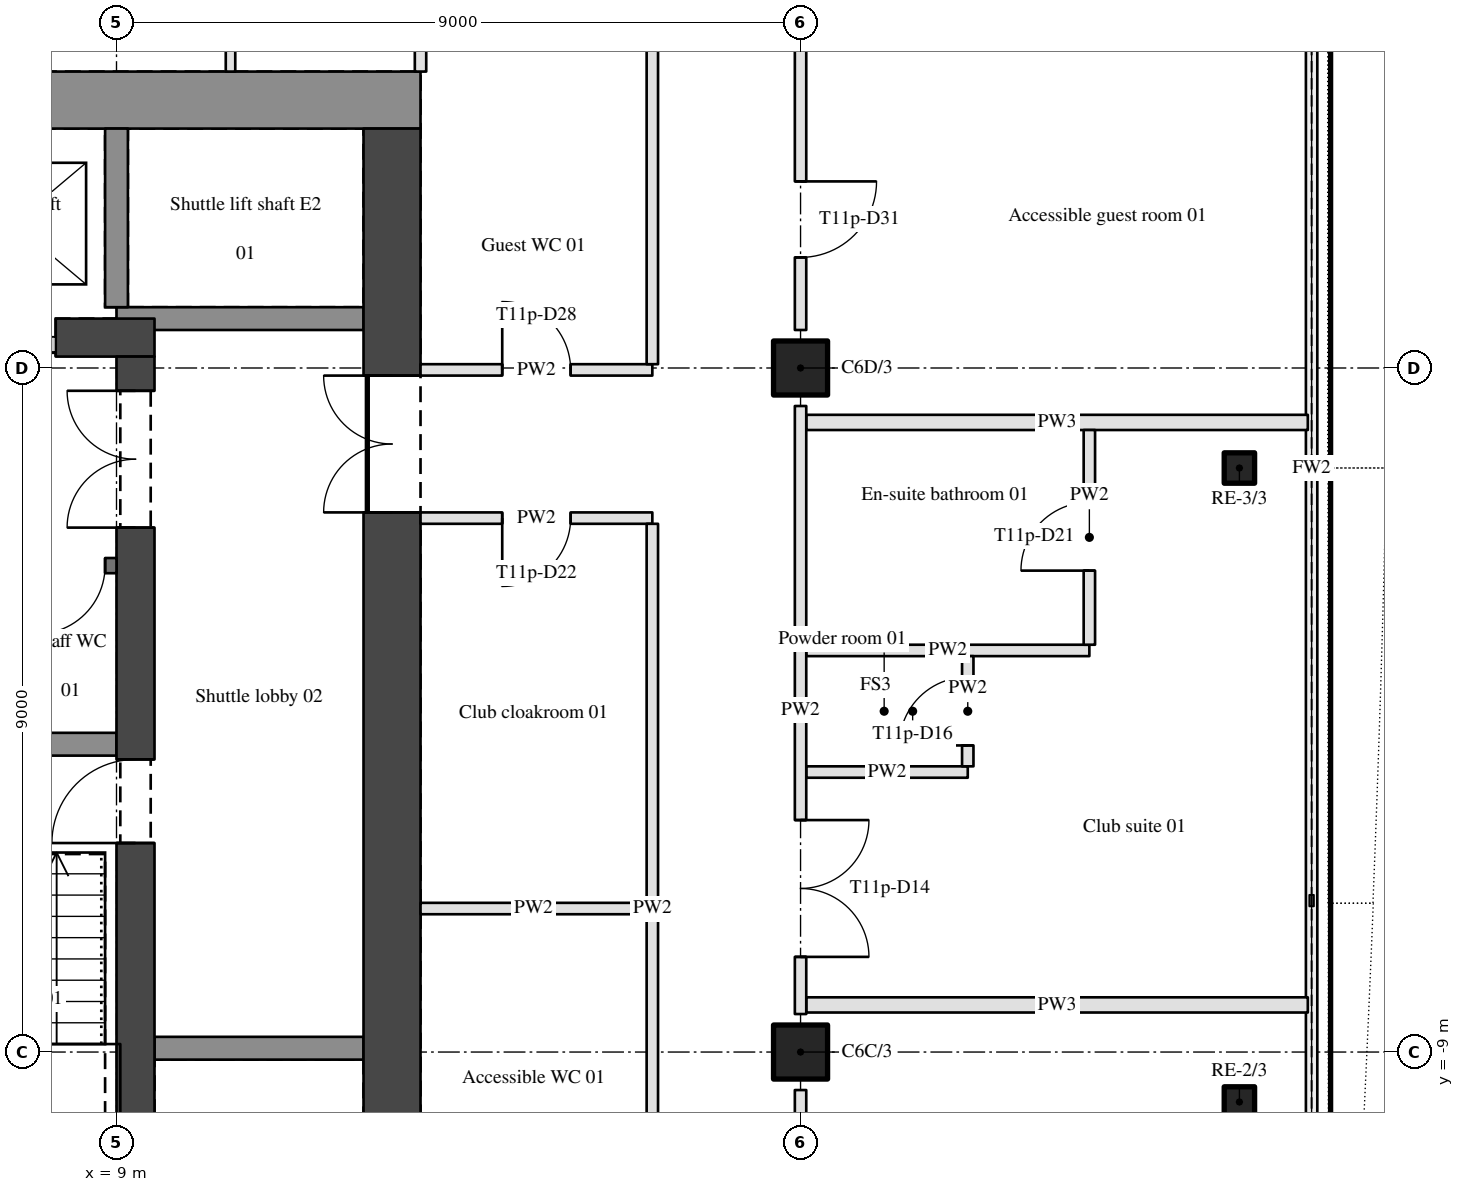
"""IFC4 building model, lengths in metres.
Left out: names, types, materials, properties, quantities, classifications, styles, units other than length and angle.
Written with IfcOpenShell. Run it as: python <this file> out.ifc"""

import sys

from ifc_helpers import new_model, si_unit, direction, frame, frame_2d, origin, origin_2d, place, context, subcontext, project, spatial, rectangle, hollow_rectangle, hollow_circle, extrude, element, fill, save


model = new_model("IFC4")
c1 = context("Model", 3, precision=1e-05, world=origin(), true_north=direction((0.0, 1.0)))
c2 = subcontext(c1, "Body", "Model", "MODEL_VIEW")
j1 = project(units=[si_unit("LENGTHUNIT", "METRE"), si_unit("PLANEANGLEUNIT", "RADIAN")], contexts=[c1])
p1 = place(None, origin())
s1 = spatial("IfcSite", under=j1, at=p1, CompositionType="ELEMENT")
p2 = place(p1, origin())
s2 = spatial("IfcBuilding", under=s1, at=p2, CompositionType="ELEMENT")
p3 = place(p2, frame((0.0, 0.0, 158.9)))
s3 = spatial("IfcBuildingStorey", under=s2, at=p3, CompositionType="ELEMENT", Elevation=158.9)
for number, where, z_axis, x_axis in (
    (1, (18.0, -9.0, 0.0), (0.0, 0.0, 1.0), (1.0, 0.0, 0.0)),
    (2, (18.0, 0.0, 0.0), (0.0, 0.0, 1.0), (1.0, 0.0, 0.0)),
):
    element("IfcColumn", number, at=place(p3, frame(where, z_axis=z_axis, x_axis=x_axis)), inside=s3, PredefinedType="COLUMN", context=c2, shape_type="SweptSolid", body=[
        extrude(hollow_circle(Radius=0.355, WallThickness=0.032, at=origin_2d()), origin(), (0.0, 0.0, 1.0), 3.4),
    ])
for number, where, z_axis, x_axis in (
    (3, (23.774, -9.657, 0.0), (0.0, 0.0, 1.0), (1.0, 0.0, 0.0)),
    (4, (23.774, -1.316, 0.0), (0.0, 0.0, 1.0), (1.0, 0.0, 0.0)),
):
    element("IfcColumn", number, at=place(p3, frame(where, z_axis=z_axis, x_axis=x_axis)), inside=s3, PredefinedType="COLUMN", context=c2, shape_type="SweptSolid", body=[
        extrude(hollow_rectangle(XDim=0.4, YDim=0.4, WallThickness=0.02, InnerFilletRadius=0.03, OuterFilletRadius=0.05, at=origin_2d()), origin(), (0.0, 0.0, 1.0), 3.4),
    ])
p4 = place(p3, frame((-13.0, 3.525, 0.0), z_axis=(0.0, 0.0, 1.0), x_axis=(1.0, 0.0, 0.0)))
e5 = element("IfcWall", 5, at=p4, inside=s3, PredefinedType="SHEAR", context=c2, shape_type="SweptSolid", body=[
    extrude(rectangle(XDim=26.0, YDim=0.75, at=frame_2d((13.0, 0.0))), origin(), (0.0, 0.0, 1.0), 3.4),
])
p5 = place(p3, frame((12.625, -11.5, 0.0), z_axis=(0.0, 0.0, 1.0), x_axis=(0.0, 1.0, 0.0)))
e6 = element("IfcWall", 6, at=p5, inside=s3, PredefinedType="SHEAR", context=c2, shape_type="SweptSolid", body=[
    extrude(rectangle(XDim=14.65, YDim=0.75, at=frame_2d((7.325, 0.0))), origin(), (0.0, 0.0, 1.0), 3.4),
])
p6 = place(p5, frame((9.6, 0.0, 0.0)))
e7 = element("IfcOpeningElement", 7, at=p6, cuts=e6, PredefinedType="OPENING", context=c2, shape_type="SweptSolid", body=[
    extrude(rectangle(XDim=1.8, YDim=2.1, at=frame_2d((0.9, 1.05))), frame((0.0, 0.385, 0.0), z_axis=(0.0, -1.0, 0.0), x_axis=(1.0, 0.0, 0.0)), (0.0, 0.0, 1.0), 0.77),
])
p7 = place(p3, frame((-9.5, 0.4, 0.0), z_axis=(0.0, 0.0, 1.0), x_axis=(1.0, 0.0, 0.0)))
e8 = element("IfcWall", 8, at=p7, inside=s3, PredefinedType="SHEAR", context=c2, shape_type="SweptSolid", body=[
    extrude(rectangle(XDim=19.0, YDim=0.5, at=frame_2d((9.5, 0.0))), origin(), (0.0, 0.0, 1.0), 3.4),
])
p8 = place(p7, frame((1.3, 0.0, 0.0)))
e9 = element("IfcOpeningElement", 9, at=p8, cuts=e8, PredefinedType="OPENING", context=c2, shape_type="SweptSolid", body=[
    extrude(rectangle(XDim=1.1, YDim=2.1, at=frame_2d((0.55, 1.05))), frame((0.0, 0.26, 0.0), z_axis=(0.0, -1.0, 0.0), x_axis=(1.0, 0.0, 0.0)), (0.0, 0.0, 1.0), 0.52),
])
p9 = place(p7, frame((4.0, 0.0, 0.0)))
e10 = element("IfcOpeningElement", 10, at=p9, cuts=e8, PredefinedType="OPENING", context=c2, shape_type="SweptSolid", body=[
    extrude(rectangle(XDim=1.1, YDim=2.1, at=frame_2d((0.55, 1.05))), frame((0.0, 0.26, 0.0), z_axis=(0.0, -1.0, 0.0), x_axis=(1.0, 0.0, 0.0)), (0.0, 0.0, 1.0), 0.52),
])
p10 = place(p7, frame((6.7, 0.0, 0.0)))
e11 = element("IfcOpeningElement", 11, at=p10, cuts=e8, PredefinedType="OPENING", context=c2, shape_type="SweptSolid", body=[
    extrude(rectangle(XDim=1.1, YDim=2.1, at=frame_2d((0.55, 1.05))), frame((0.0, 0.26, 0.0), z_axis=(0.0, -1.0, 0.0), x_axis=(1.0, 0.0, 0.0)), (0.0, 0.0, 1.0), 0.52),
])
p11 = place(p7, frame((11.2, 0.0, 0.0)))
e12 = element("IfcOpeningElement", 12, at=p11, cuts=e8, PredefinedType="OPENING", context=c2, shape_type="SweptSolid", body=[
    extrude(rectangle(XDim=1.1, YDim=2.1, at=frame_2d((0.55, 1.05))), frame((0.0, 0.26, 0.0), z_axis=(0.0, -1.0, 0.0), x_axis=(1.0, 0.0, 0.0)), (0.0, 0.0, 1.0), 0.52),
])
p12 = place(p7, frame((13.9, 0.0, 0.0)))
e13 = element("IfcOpeningElement", 13, at=p12, cuts=e8, PredefinedType="OPENING", context=c2, shape_type="SweptSolid", body=[
    extrude(rectangle(XDim=1.1, YDim=2.1, at=frame_2d((0.55, 1.05))), frame((0.0, 0.26, 0.0), z_axis=(0.0, -1.0, 0.0), x_axis=(1.0, 0.0, 0.0)), (0.0, 0.0, 1.0), 0.52),
])
p13 = place(p7, frame((16.6, 0.0, 0.0)))
e14 = element("IfcOpeningElement", 14, at=p13, cuts=e8, PredefinedType="OPENING", context=c2, shape_type="SweptSolid", body=[
    extrude(rectangle(XDim=1.1, YDim=2.1, at=frame_2d((0.55, 1.05))), frame((0.0, 0.26, 0.0), z_axis=(0.0, -1.0, 0.0), x_axis=(1.0, 0.0, 0.0)), (0.0, 0.0, 1.0), 0.52),
])
p14 = place(p3, frame((9.25, -11.5, 0.0), z_axis=(0.0, 0.0, 1.0), x_axis=(0.0, 1.0, 0.0)))
e15 = element("IfcWall", 15, at=p14, inside=s3, PredefinedType="SHEAR", context=c2, shape_type="SweptSolid", body=[
    extrude(rectangle(XDim=11.65, YDim=0.5, at=frame_2d((5.825, 0.0))), origin(), (0.0, 0.0, 1.0), 3.4),
])
p15 = place(p14, frame((9.4, 0.0, 0.0)))
e16 = element("IfcOpeningElement", 16, at=p15, cuts=e15, PredefinedType="OPENING", context=c2, shape_type="SweptSolid", body=[
    extrude(rectangle(XDim=1.8, YDim=2.1, at=frame_2d((0.9, 1.05))), frame((0.0, 0.26, 0.0), z_axis=(0.0, -1.0, 0.0), x_axis=(1.0, 0.0, 0.0)), (0.0, 0.0, 1.0), 0.52),
])
p16 = place(p14, frame((5.25, 0.0, 0.0)))
e17 = element("IfcOpeningElement", 17, at=p16, cuts=e15, PredefinedType="OPENING", context=c2, shape_type="SweptSolid", body=[
    extrude(rectangle(XDim=1.1, YDim=2.1, at=frame_2d((0.55, 1.05))), frame((0.0, 0.26, 0.0), z_axis=(0.0, -1.0, 0.0), x_axis=(1.0, 0.0, 0.0)), (0.0, 0.0, 1.0), 0.52),
])
p17 = place(p3, frame((9.5, -8.95, 0.0), z_axis=(0.0, 0.0, 1.0), x_axis=(1.0, 0.0, 0.0)))
e18 = element("IfcWall", 18, at=p17, inside=s3, PredefinedType="SHEAR", context=c2, shape_type="SweptSolid", body=[
    extrude(rectangle(XDim=2.75, YDim=0.3, at=frame_2d((1.375, 0.0))), origin(), (0.0, 0.0, 1.0), 3.4),
])
p18 = place(p3, frame((18.075, -8.38, 0.0), z_axis=(0.0, 0.0, 1.0), x_axis=(1.0, 0.0, 0.0)))
e19 = element("IfcWall", 19, at=p18, inside=s3, PredefinedType="PARTITIONING", context=c2, shape_type="SweptSolid", body=[
    extrude(rectangle(XDim=6.599, YDim=0.2, at=frame_2d((3.3, 0.0))), origin(), (0.0, 0.0, 1.0), 2.46),
])
p19 = place(p3, frame((13.0, -7.112, 0.0), z_axis=(0.0, 0.0, 1.0), x_axis=(1.0, 0.0, 0.0)))
e20 = element("IfcWall", 20, at=p19, inside=s3, PredefinedType="PARTITIONING", context=c2, shape_type="SweptSolid", body=[
    extrude(rectangle(XDim=2.975, YDim=0.15, at=frame_2d((1.488, 0.0))), origin(), (0.0, 0.0, 1.0), 2.46),
])
p20 = place(p3, frame((18.075, -5.316, 0.0), z_axis=(0.0, 0.0, 1.0), x_axis=(1.0, 0.0, 0.0)))
e21 = element("IfcWall", 21, at=p20, inside=s3, PredefinedType="PARTITIONING", context=c2, shape_type="SweptSolid", body=[
    extrude(rectangle(XDim=2.125, YDim=0.15, at=frame_2d((1.062, 0.0))), origin(), (0.0, 0.0, 1.0), 2.46),
])
p21 = place(p3, frame((2.25, -4.95, 0.0), z_axis=(0.0, 0.0, 1.0), x_axis=(1.0, 0.0, 0.0)))
e22 = element("IfcWall", 22, at=p21, inside=s3, PredefinedType="SHEAR", context=c2, shape_type="SweptSolid", body=[
    extrude(rectangle(XDim=6.75, YDim=0.3, at=frame_2d((3.375, 0.0))), origin(), (0.0, 0.0, 1.0), 3.4),
])
p22 = place(p3, frame((18.075, -3.716, 0.0), z_axis=(0.0, 0.0, 1.0), x_axis=(1.0, 0.0, 0.0)))
e23 = element("IfcWall", 23, at=p22, inside=s3, PredefinedType="PARTITIONING", context=c2, shape_type="SweptSolid", body=[
    extrude(rectangle(XDim=3.725, YDim=0.15, at=frame_2d((1.863, 0.0))), origin(), (0.0, 0.0, 1.0), 2.46),
])
p23 = place(p3, frame((9.0, -2.6, 0.0), z_axis=(0.0, 0.0, 1.0), x_axis=(-1.0, 0.0, 0.0)))
e24 = element("IfcWall", 24, at=p23, inside=s3, PredefinedType="SOLIDWALL", context=c2, shape_type="SweptSolid", body=[
    extrude(rectangle(XDim=1.2, YDim=0.2, at=frame_2d((0.6, 0.0))), origin(), (0.0, 0.0, 1.0), 3.1),
])
p24 = place(p23, frame((0.15, 0.0, 0.0)))
e25 = element("IfcOpeningElement", 25, at=p24, cuts=e24, PredefinedType="OPENING", context=c2, shape_type="SweptSolid", body=[
    extrude(rectangle(XDim=0.9, YDim=2.1, at=frame_2d((0.45, 1.05))), frame((0.0, 0.11, 0.0), z_axis=(0.0, -1.0, 0.0), x_axis=(1.0, 0.0, 0.0)), (0.0, 0.0, 1.0), 0.22),
])
p25 = place(p3, frame((16.05, -1.975, 0.0), z_axis=(0.0, 0.0, 1.0), x_axis=(-1.0, 0.0, 0.0)))
e26 = element("IfcWall", 26, at=p25, inside=s3, PredefinedType="PARTITIONING", context=c2, shape_type="SweptSolid", body=[
    extrude(rectangle(XDim=3.05, YDim=0.15, at=frame_2d((1.525, 0.0))), origin(), (0.0, 0.0, 1.0), 2.46),
])
p26 = place(p25, frame((1.075, 0.0, 0.0)))
e27 = element("IfcOpeningElement", 27, at=p26, cuts=e26, PredefinedType="OPENING", context=c2, shape_type="SweptSolid", body=[
    extrude(rectangle(XDim=0.9, YDim=2.1, at=frame_2d((0.45, 1.05))), frame((0.0, 0.085, 0.0), z_axis=(0.0, -1.0, 0.0), x_axis=(1.0, 0.0, 0.0)), (0.0, 0.0, 1.0), 0.17),
])
p27 = place(p3, frame((18.075, -0.716, 0.0), z_axis=(0.0, 0.0, 1.0), x_axis=(1.0, 0.0, 0.0)))
e28 = element("IfcWall", 28, at=p27, inside=s3, PredefinedType="PARTITIONING", context=c2, shape_type="SweptSolid", body=[
    extrude(rectangle(XDim=6.599, YDim=0.2, at=frame_2d((3.3, 0.0))), origin(), (0.0, 0.0, 1.0), 2.46),
])
p28 = place(p3, frame((13.0, -0.025, 0.0), z_axis=(0.0, 0.0, 1.0), x_axis=(1.0, 0.0, 0.0)))
e29 = element("IfcWall", 29, at=p28, inside=s3, PredefinedType="PARTITIONING", context=c2, shape_type="SweptSolid", body=[
    extrude(rectangle(XDim=3.05, YDim=0.15, at=frame_2d((1.525, 0.0))), origin(), (0.0, 0.0, 1.0), 2.46),
])
p29 = place(p28, frame((1.075, 0.0, 0.0)))
e30 = element("IfcOpeningElement", 30, at=p29, cuts=e29, PredefinedType="OPENING", context=c2, shape_type="SweptSolid", body=[
    extrude(rectangle(XDim=0.9, YDim=2.1, at=frame_2d((0.45, 1.05))), frame((0.0, 0.085, 0.0), z_axis=(0.0, -1.0, 0.0), x_axis=(1.0, 0.0, 0.0)), (0.0, 0.0, 1.0), 0.17),
])
p30 = place(p3, frame((12.25, 0.65, 0.0), z_axis=(0.0, 0.0, 1.0), x_axis=(-1.0, 0.0, 0.0)))
e31 = element("IfcWall", 31, at=p30, inside=s3, PredefinedType="SHEAR", context=c2, shape_type="SweptSolid", body=[
    extrude(rectangle(XDim=3.25, YDim=0.3, at=frame_2d((1.625, 0.0))), origin(), (0.0, 0.0, 1.0), 3.4),
])
p31 = place(p3, frame((9.0, 0.8, 0.0), z_axis=(0.0, 0.0, 1.0), x_axis=(0.0, 1.0, 0.0)))
e32 = element("IfcWall", 32, at=p31, inside=s3, PredefinedType="SHEAR", context=c2, shape_type="SweptSolid", body=[
    extrude(rectangle(XDim=2.35, YDim=0.3, at=frame_2d((1.175, 0.0))), origin(), (0.0, 0.0, 1.0), 3.4),
])
p32 = place(p3, frame((10.5, 3.9, 0.0), z_axis=(0.0, 0.0, 1.0), x_axis=(0.0, 1.0, 0.0)))
e33 = element("IfcWall", 33, at=p32, inside=s3, PredefinedType="PARTITIONING", context=c2, shape_type="SweptSolid", body=[
    extrude(rectangle(XDim=6.725, YDim=0.125, at=frame_2d((3.363, 0.0))), origin(), (0.0, 0.0, 1.0), 2.46),
])
p33 = place(p3, frame((13.0, 3.9, 0.0), z_axis=(0.0, 0.0, 1.0), x_axis=(0.0, 1.0, 0.0)))
e34 = element("IfcWall", 34, at=p33, inside=s3, PredefinedType="PARTITIONING", context=c2, shape_type="SweptSolid", body=[
    extrude(rectangle(XDim=1.362, YDim=0.15, at=frame_2d((0.681, 0.0))), origin(), (0.0, 0.0, 1.0), 2.46),
])
p34 = place(p3, frame((16.05, -12.175, 0.0), z_axis=(0.0, 0.0, 1.0), x_axis=(0.0, 1.0, 0.0)))
e35 = element("IfcWall", 35, at=p34, inside=s3, PredefinedType="PARTITIONING", context=c2, shape_type="SweptSolid", body=[
    extrude(rectangle(XDim=10.125, YDim=0.15, at=frame_2d((5.062, 0.0))), origin(), (0.0, 0.0, 1.0), 2.46),
])
p35 = place(p3, frame((16.05, 0.05, 0.0), z_axis=(0.0, 0.0, 1.0), x_axis=(0.0, 1.0, 0.0)))
e36 = element("IfcWall", 36, at=p35, inside=s3, PredefinedType="PARTITIONING", context=c2, shape_type="SweptSolid", body=[
    extrude(rectangle(XDim=10.575, YDim=0.15, at=frame_2d((5.288, 0.0))), origin(), (0.0, 0.0, 1.0), 2.46),
])
p36 = place(p3, frame((18.0, -12.175, 0.0), z_axis=(0.0, 0.0, 1.0), x_axis=(0.0, 1.0, 0.0)))
e37 = element("IfcWall", 37, at=p36, inside=s3, PredefinedType="PARTITIONING", context=c2, shape_type="SweptSolid", body=[
    extrude(rectangle(XDim=2.675, YDim=0.15, at=frame_2d((1.337, 0.0))), origin(), (0.0, 0.0, 1.0), 2.46),
])
p37 = place(p3, frame((18.0, -0.5, 0.0), z_axis=(0.0, 0.0, 1.0), x_axis=(0.0, -1.0, 0.0)))
e38 = element("IfcWall", 38, at=p37, inside=s3, PredefinedType="PARTITIONING", context=c2, shape_type="SweptSolid", body=[
    extrude(rectangle(XDim=8.0, YDim=0.15, at=frame_2d((4.0, 0.0))), origin(), (0.0, 0.0, 1.0), 2.46),
])
p38 = place(p37, frame((5.448, 0.0, 0.0)))
e39 = element("IfcOpeningElement", 39, at=p38, cuts=e38, PredefinedType="OPENING", context=c2, shape_type="SweptSolid", body=[
    extrude(rectangle(XDim=1.8, YDim=2.1, at=frame_2d((0.9, 1.05))), frame((0.0, 0.085, 0.0), z_axis=(0.0, -1.0, 0.0), x_axis=(1.0, 0.0, 0.0)), (0.0, 0.0, 1.0), 0.17),
])
p39 = place(p3, frame((18.0, 8.5, 0.0), z_axis=(0.0, 0.0, 1.0), x_axis=(0.0, -1.0, 0.0)))
e40 = element("IfcWall", 40, at=p39, inside=s3, PredefinedType="PARTITIONING", context=c2, shape_type="SweptSolid", body=[
    extrude(rectangle(XDim=8.0, YDim=0.15, at=frame_2d((4.0, 0.0))), origin(), (0.0, 0.0, 1.0), 2.46),
])
p40 = place(p39, frame((6.045, 0.0, 0.0)))
e41 = element("IfcOpeningElement", 41, at=p40, cuts=e40, PredefinedType="OPENING", context=c2, shape_type="SweptSolid", body=[
    extrude(rectangle(XDim=1.0, YDim=2.1, at=frame_2d((0.5, 1.05))), frame((0.0, 0.085, 0.0), z_axis=(0.0, -1.0, 0.0), x_axis=(1.0, 0.0, 0.0)), (0.0, 0.0, 1.0), 0.17),
])
p41 = place(p3, frame((20.2, -5.241, 0.0), z_axis=(0.0, 0.0, 1.0), x_axis=(0.0, 1.0, 0.0)))
e42 = element("IfcWall", 42, at=p41, inside=s3, PredefinedType="PARTITIONING", context=c2, shape_type="SweptSolid", body=[
    extrude(rectangle(XDim=1.45, YDim=0.15, at=frame_2d((0.725, 0.0))), origin(), (0.0, 0.0, 1.0), 2.46),
])
p42 = place(p41, frame((0.275, 0.0, 0.0)))
e43 = element("IfcOpeningElement", 43, at=p42, cuts=e42, PredefinedType="OPENING", context=c2, shape_type="SweptSolid", body=[
    extrude(rectangle(XDim=0.9, YDim=2.1, at=frame_2d((0.45, 1.05))), frame((0.0, 0.085, 0.0), z_axis=(0.0, -1.0, 0.0), x_axis=(1.0, 0.0, 0.0)), (0.0, 0.0, 1.0), 0.17),
])
p43 = place(p3, frame((21.8, -3.641, 0.0), z_axis=(0.0, 0.0, 1.0), x_axis=(0.0, 1.0, 0.0)))
e44 = element("IfcWall", 44, at=p43, inside=s3, PredefinedType="PARTITIONING", context=c2, shape_type="SweptSolid", body=[
    extrude(rectangle(XDim=2.825, YDim=0.15, at=frame_2d((1.413, 0.0))), origin(), (0.0, 0.0, 1.0), 2.46),
])
p44 = place(p43, frame((0.975, 0.0, 0.0)))
e45 = element("IfcOpeningElement", 45, at=p44, cuts=e44, PredefinedType="OPENING", context=c2, shape_type="SweptSolid", body=[
    extrude(rectangle(XDim=0.9, YDim=2.1, at=frame_2d((0.45, 1.05))), frame((0.0, 0.085, 0.0), z_axis=(0.0, -1.0, 0.0), x_axis=(1.0, 0.0, 0.0)), (0.0, 0.0, 1.0), 0.17),
])
p45 = place(p6, origin())
e46 = element("IfcDoor", 46, at=p45, inside=s3, OperationType="DOUBLE_DOOR_SINGLE_SWING", PredefinedType="DOOR", context=c2, shape_type="SweptSolid", body=[
    extrude(rectangle(XDim=1.8, YDim=2.1, at=frame_2d((0.9, 1.05))), frame((0.0, 0.025, 0.0), z_axis=(0.0, -1.0, 0.0), x_axis=(1.0, 0.0, 0.0)), (0.0, 0.0, 1.0), 0.05),
])
fill(e7, e46)
p46 = place(p15, origin())
e47 = element("IfcDoor", 47, at=p46, inside=s3, OperationType="DOUBLE_DOOR_SINGLE_SWING", PredefinedType="DOOR", context=c2, shape_type="SweptSolid", body=[
    extrude(rectangle(XDim=1.8, YDim=2.1, at=frame_2d((0.9, 1.05))), frame((0.0, 0.025, 0.0), z_axis=(0.0, -1.0, 0.0), x_axis=(1.0, 0.0, 0.0)), (0.0, 0.0, 1.0), 0.05),
])
fill(e16, e47)
p47 = place(p16, origin())
e48 = element("IfcDoor", 48, at=p47, inside=s3, OperationType="SINGLE_SWING_LEFT", PredefinedType="DOOR", context=c2, shape_type="SweptSolid", body=[
    extrude(rectangle(XDim=1.1, YDim=2.1, at=frame_2d((0.55, 1.05))), frame((0.0, 0.025, 0.0), z_axis=(0.0, -1.0, 0.0), x_axis=(1.0, 0.0, 0.0)), (0.0, 0.0, 1.0), 0.05),
])
fill(e17, e48)
p48 = place(p24, origin())
e49 = element("IfcDoor", 49, at=p48, inside=s3, OperationType="SINGLE_SWING_RIGHT", PredefinedType="DOOR", context=c2, shape_type="SweptSolid", body=[
    extrude(rectangle(XDim=0.9, YDim=2.1, at=frame_2d((0.45, 1.05))), frame((0.0, 0.025, 0.0), z_axis=(0.0, -1.0, 0.0), x_axis=(1.0, 0.0, 0.0)), (0.0, 0.0, 1.0), 0.05),
])
fill(e25, e49)
p49 = place(p38, origin())
e50 = element("IfcDoor", 50, at=p49, inside=s3, OperationType="DOUBLE_DOOR_SINGLE_SWING", PredefinedType="DOOR", context=c2, shape_type="SweptSolid", body=[
    extrude(rectangle(XDim=1.8, YDim=2.1, at=frame_2d((0.9, 1.05))), frame((0.0, 0.025, 0.0), z_axis=(0.0, -1.0, 0.0), x_axis=(1.0, 0.0, 0.0)), (0.0, 0.0, 1.0), 0.05),
])
fill(e39, e50)
p50 = place(p40, origin())
e51 = element("IfcDoor", 51, at=p50, inside=s3, OperationType="SINGLE_SWING_LEFT", PredefinedType="DOOR", context=c2, shape_type="SweptSolid", body=[
    extrude(rectangle(XDim=1.0, YDim=2.1, at=frame_2d((0.5, 1.05))), frame((0.0, 0.025, 0.0), z_axis=(0.0, -1.0, 0.0), x_axis=(1.0, 0.0, 0.0)), (0.0, 0.0, 1.0), 0.05),
])
fill(e41, e51)
p51 = place(p29, origin())
e52 = element("IfcDoor", 52, at=p51, inside=s3, OperationType="SINGLE_SWING_LEFT", PredefinedType="DOOR", context=c2, shape_type="SweptSolid", body=[
    extrude(rectangle(XDim=0.9, YDim=2.1, at=frame_2d((0.45, 1.05))), frame((0.0, 0.025, 0.0), z_axis=(0.0, -1.0, 0.0), x_axis=(1.0, 0.0, 0.0)), (0.0, 0.0, 1.0), 0.05),
])
fill(e30, e52)
p52 = place(p26, origin())
e53 = element("IfcDoor", 53, at=p52, inside=s3, OperationType="SINGLE_SWING_RIGHT", PredefinedType="DOOR", context=c2, shape_type="SweptSolid", body=[
    extrude(rectangle(XDim=0.9, YDim=2.1, at=frame_2d((0.45, 1.05))), frame((0.0, 0.025, 0.0), z_axis=(0.0, -1.0, 0.0), x_axis=(1.0, 0.0, 0.0)), (0.0, 0.0, 1.0), 0.05),
])
fill(e27, e53)
p53 = place(p44, origin())
e54 = element("IfcDoor", 54, at=p53, inside=s3, OperationType="SINGLE_SWING_LEFT", PredefinedType="DOOR", context=c2, shape_type="SweptSolid", body=[
    extrude(rectangle(XDim=0.9, YDim=2.1, at=frame_2d((0.45, 1.05))), frame((0.0, 0.025, 0.0), z_axis=(0.0, -1.0, 0.0), x_axis=(1.0, 0.0, 0.0)), (0.0, 0.0, 1.0), 0.05),
])
fill(e45, e54)
p54 = place(p42, origin())
e55 = element("IfcDoor", 55, at=p54, inside=s3, OperationType="SINGLE_SWING_LEFT", PredefinedType="DOOR", context=c2, shape_type="SweptSolid", body=[
    extrude(rectangle(XDim=0.9, YDim=2.1, at=frame_2d((0.45, 1.05))), frame((0.0, 0.025, 0.0), z_axis=(0.0, -1.0, 0.0), x_axis=(1.0, 0.0, 0.0)), (0.0, 0.0, 1.0), 0.05),
])
fill(e43, e55)
p55 = place(p13, origin())
e56 = element("IfcDoor", 56, at=p55, inside=s3, OperationType="DOUBLE_DOOR_SLIDING", PredefinedType="DOOR", context=c2, shape_type="SweptSolid", body=[
    extrude(rectangle(XDim=1.1, YDim=2.1, at=frame_2d((0.55, 1.05))), frame((0.0, 0.025, 0.0), z_axis=(0.0, -1.0, 0.0), x_axis=(1.0, 0.0, 0.0)), (0.0, 0.0, 1.0), 0.05),
])
fill(e14, e56)
save(model, sys.argv[1])
